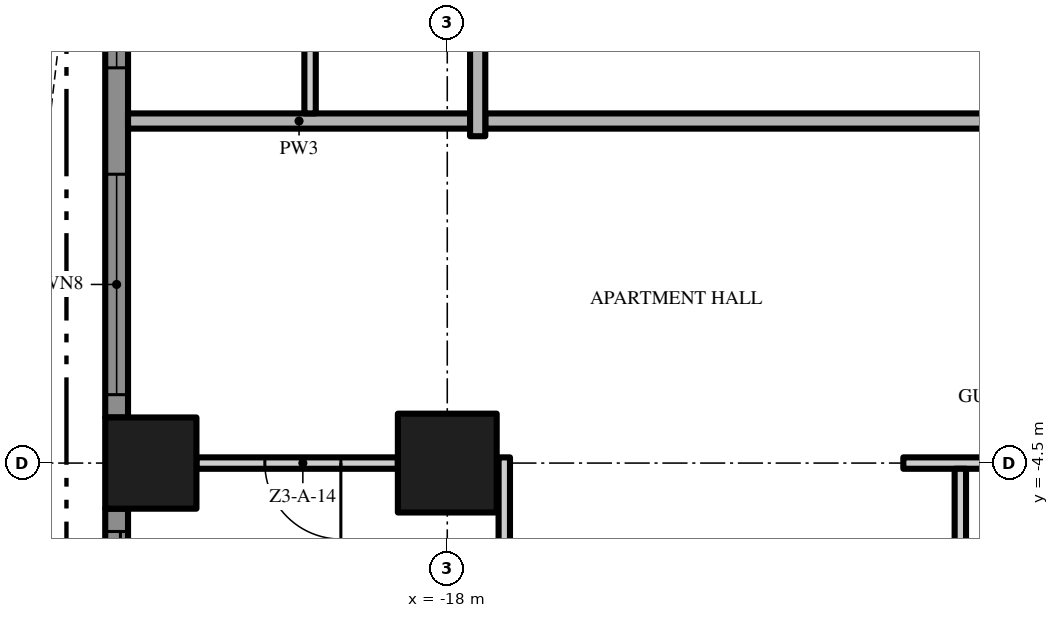
"""IFC4 building model, lengths in metres.
Left out: names, types, materials, properties, quantities, classifications, styles, units other than length and angle.
Written with IfcOpenShell. Run it as: python <this file> out.ifc"""

import sys

from ifc_helpers import new_model, si_unit, direction, frame, frame_2d, origin, origin_2d, place, context, subcontext, project, spatial, polyline, rectangle, outline, extrude, element, fill, save


model = new_model("IFC4")
c1 = context("Model", 3, precision=1e-05, world=origin(), true_north=direction((0.0, 1.0)))
c2 = subcontext(c1, "Body", "Model", "MODEL_VIEW")
j1 = project(units=[si_unit("LENGTHUNIT", "METRE"), si_unit("PLANEANGLEUNIT", "RADIAN")], contexts=[c1])
p1 = place(None, origin())
s1 = spatial("IfcSite", under=j1, at=p1, CompositionType="ELEMENT")
p2 = place(p1, origin())
s2 = spatial("IfcBuilding", under=s1, at=p2, CompositionType="ELEMENT")
p3 = place(p2, frame((0.0, 0.0, 132.6)))
s3 = spatial("IfcBuildingStorey", under=s2, at=p3, CompositionType="ELEMENT", Elevation=132.6)
p4 = place(p3, frame((-18.0, -4.5, 0.0), z_axis=(0.0, 0.0, 1.0), x_axis=(1.0, 0.0, 0.0)))
e1 = element("IfcColumn", 1, at=p4, inside=s3, PredefinedType="COLUMN", context=c2, shape_type="SweptSolid", body=[
    extrude(rectangle(XDim=1.3, YDim=1.3, at=origin_2d()), origin(), (0.0, 0.0, 1.0), 3.5),
])
p5 = place(p3, frame((-21.9, -4.5, 0.0), z_axis=(0.0, 0.0, 1.0), x_axis=(1.0, 0.0, 0.0)))
e2 = element("IfcColumn", 2, at=p5, inside=s3, PredefinedType="COLUMN", context=c2, shape_type="SweptSolid", body=[
    extrude(rectangle(XDim=1.2, YDim=1.2, at=origin_2d()), origin(), (0.0, 0.0, 1.0), 3.5),
])
p6 = place(p3, frame((-22.35, -3.9, 0.0), z_axis=(0.0, 0.0, 1.0), x_axis=(0.0, 1.0, 0.0)))
e3 = element("IfcWall", 3, at=p6, inside=s3, PredefinedType="SOLIDWALL", context=c2, shape_type="SweptSolid", body=[
    extrude(rectangle(XDim=7.8, YDim=0.3, at=frame_2d((3.9, 0.0))), origin(), (0.0, 0.0, 1.0), 3.5),
])
p7 = place(p6, frame((4.6, 0.0, 0.45)))
e4 = element("IfcOpeningElement", 4, at=p7, cuts=e3, PredefinedType="OPENING", context=c2, shape_type="SweptSolid", body=[
    extrude(rectangle(XDim=2.9, YDim=2.65, at=frame_2d((1.45, 1.325))), frame((0.0, 0.16, 0.0), z_axis=(0.0, -1.0, 0.0), x_axis=(1.0, 0.0, 0.0)), (0.0, 0.0, 1.0), 0.32),
])
p8 = place(p6, frame((0.3, 0.0, 0.45)))
e5 = element("IfcOpeningElement", 5, at=p8, cuts=e3, PredefinedType="OPENING", context=c2, shape_type="SweptSolid", body=[
    extrude(rectangle(XDim=2.9, YDim=2.65, at=frame_2d((1.45, 1.325))), frame((0.0, 0.16, 0.0), z_axis=(0.0, -1.0, 0.0), x_axis=(1.0, 0.0, 0.0)), (0.0, 0.0, 1.0), 0.32),
])
p9 = place(p3, frame((-22.35, -12.3, 0.0), z_axis=(0.0, 0.0, 1.0), x_axis=(0.0, 1.0, 0.0)))
e6 = element("IfcWall", 6, at=p9, inside=s3, PredefinedType="SOLIDWALL", context=c2, shape_type="SweptSolid", body=[
    extrude(rectangle(XDim=7.2, YDim=0.3, at=frame_2d((3.6, 0.0))), origin(), (0.0, 0.0, 1.0), 3.5),
])
p10 = place(p9, frame((4.0, 0.0, 0.0)))
e7 = element("IfcOpeningElement", 7, at=p10, cuts=e6, PredefinedType="OPENING", context=c2, shape_type="SweptSolid", body=[
    extrude(rectangle(XDim=2.9, YDim=2.4, at=frame_2d((1.45, 1.2))), frame((0.0, 0.16, 0.0), z_axis=(0.0, -1.0, 0.0), x_axis=(1.0, 0.0, 0.0)), (0.0, 0.0, 1.0), 0.32),
])
p11 = place(p9, frame((0.3, 0.0, 0.45)))
e8 = element("IfcOpeningElement", 8, at=p11, cuts=e6, PredefinedType="OPENING", context=c2, shape_type="SweptSolid", body=[
    extrude(rectangle(XDim=2.3, YDim=2.65, at=frame_2d((1.15, 1.325))), frame((0.0, 0.16, 0.0), z_axis=(0.0, -1.0, 0.0), x_axis=(1.0, 0.0, 0.0)), (0.0, 0.0, 1.0), 0.32),
])
p12 = place(p3, origin())
e9 = element("IfcWall", 9, at=p12, inside=s3, PredefinedType="USERDEFINED", context=c2, shape_type="SweptSolid", body=[
    extrude(outline(polyline([(-23.451, 18.0), (-23.115, 16.5), (-23.1, 16.125), (-23.231, 15.0), (-23.755, 13.5), (-24.488, 12.0), (-25.149, 10.5), (-25.485, 9.0), (-25.5, 8.625), (-25.369, 7.5), (-24.845, 6.0), (-24.112, 4.5), (-23.451, 3.0), (-23.115, 1.5), (-23.1, 1.125), (-23.231, 0.0), (-23.755, -1.5), (-24.488, -3.0), (-25.149, -4.5), (-25.485, -6.0), (-25.5, -6.375), (-25.369, -7.5), (-24.845, -9.0), (-24.112, -10.5), (-23.451, -12.0), (-23.115, -13.5), (-22.871, -13.445), (-23.213, -11.921), (-23.885, -10.395), (-24.614, -8.904), (-25.124, -7.444), (-25.249, -6.365), (-25.236, -6.033), (-24.91, -4.579), (-24.261, -3.105), (-23.524, -1.596), (-22.986, -0.056), (-22.849, 1.115), (-22.866, 1.533), (-23.213, 3.079), (-23.885, 4.605), (-24.614, 6.096), (-25.124, 7.556), (-25.249, 8.635), (-25.236, 8.967), (-24.91, 10.421), (-24.261, 11.895), (-23.524, 13.404), (-22.986, 14.944), (-22.849, 16.115), (-22.866, 16.533), (-23.208, 18.055), (-23.451, 18.0)])), origin(), (0.0, 0.0, 1.0), 0.9),
])
p13 = place(p3, frame((-18.65, -4.5, 0.0), z_axis=(0.0, 0.0, 1.0), x_axis=(-1.0, 0.0, 0.0)))
e10 = element("IfcWall", 10, at=p13, inside=s3, PredefinedType="PARTITIONING", context=c2, shape_type="SweptSolid", body=[
    extrude(rectangle(XDim=2.65, YDim=0.15, at=frame_2d((1.325, 0.0))), origin(), (0.0, 0.0, 1.0), 3.5),
])
p14 = place(p13, frame((0.75, 0.0, 0.0)))
e11 = element("IfcOpeningElement", 11, at=p14, cuts=e10, PredefinedType="OPENING", context=c2, shape_type="SweptSolid", body=[
    extrude(rectangle(XDim=1.0, YDim=2.4, at=frame_2d((0.5, 1.2))), frame((0.0, 0.085, 0.0), z_axis=(0.0, -1.0, 0.0), x_axis=(1.0, 0.0, 0.0)), (0.0, 0.0, 1.0), 0.17),
])
p15 = place(p3, frame((-12.0, -4.5, 0.0), z_axis=(0.0, 0.0, 1.0), x_axis=(1.0, 0.0, 0.0)))
e12 = element("IfcWall", 12, at=p15, inside=s3, PredefinedType="PARTITIONING", context=c2, shape_type="SweptSolid", body=[
    extrude(rectangle(XDim=2.35, YDim=0.15, at=frame_2d((1.175, 0.0))), origin(), (0.0, 0.0, 1.0), 3.5),
])
p16 = place(p3, frame((17.5, 0.0, 0.0), z_axis=(0.0, 0.0, 1.0), x_axis=(-1.0, 0.0, 0.0)))
e13 = element("IfcWall", 13, at=p16, inside=s3, PredefinedType="PARTITIONING", context=c2, shape_type="SweptSolid", body=[
    extrude(rectangle(XDim=35.0, YDim=0.2, at=frame_2d((17.5, 0.0))), origin(), (0.0, 0.0, 1.0), 3.5),
])
p17 = place(p16, frame((16.75, 0.0, 0.0)))
e14 = element("IfcOpeningElement", 14, at=p17, cuts=e13, PredefinedType="OPENING", context=c2, shape_type="SweptSolid", body=[
    extrude(rectangle(XDim=1.5, YDim=2.4, at=frame_2d((0.75, 1.2))), frame((0.0, 0.11, 0.0), z_axis=(0.0, -1.0, 0.0), x_axis=(1.0, 0.0, 0.0)), (0.0, 0.0, 1.0), 0.22),
])
p18 = place(p3, frame((-22.2, 0.0, 0.0), z_axis=(0.0, 0.0, 1.0), x_axis=(1.0, 0.0, 0.0)))
e15 = element("IfcWall", 15, at=p18, inside=s3, PredefinedType="PARTITIONING", context=c2, shape_type="SweptSolid", body=[
    extrude(rectangle(XDim=4.5, YDim=0.2, at=frame_2d((2.25, 0.0))), origin(), (0.0, 0.0, 1.0), 3.5),
])
p19 = place(p3, frame((-19.805, 0.1, 0.0), z_axis=(0.0, 0.0, 1.0), x_axis=(0.0, 1.0, 0.0)))
e16 = element("IfcWall", 16, at=p19, inside=s3, PredefinedType="PARTITIONING", context=c2, shape_type="SweptSolid", body=[
    extrude(rectangle(XDim=2.225, YDim=0.15, at=frame_2d((1.113, 0.0))), origin(), (0.0, 0.0, 1.0), 3.5),
])
p20 = place(p3, frame((-17.6, -0.2, 0.0), z_axis=(0.0, 0.0, 1.0), x_axis=(0.0, 1.0, 0.0)))
e17 = element("IfcWall", 17, at=p20, inside=s3, PredefinedType="PARTITIONING", context=c2, shape_type="SweptSolid", body=[
    extrude(rectangle(XDim=4.05, YDim=0.2, at=frame_2d((2.025, 0.0))), origin(), (0.0, 0.0, 1.0), 3.5),
])
p21 = place(p3, frame((-17.25, -8.925, 0.0), z_axis=(0.0, 0.0, 1.0), x_axis=(0.0, 1.0, 0.0)))
e18 = element("IfcWall", 18, at=p21, inside=s3, PredefinedType="PARTITIONING", context=c2, shape_type="SweptSolid", body=[
    extrude(rectangle(XDim=4.5, YDim=0.15, at=frame_2d((2.25, 0.0))), origin(), (0.0, 0.0, 1.0), 3.5),
])
p22 = place(p3, frame((-11.25, -4.575, 0.0), z_axis=(0.0, 0.0, 1.0), x_axis=(0.0, -1.0, 0.0)))
e19 = element("IfcWall", 19, at=p22, inside=s3, PredefinedType="PARTITIONING", context=c2, shape_type="SweptSolid", body=[
    extrude(rectangle(XDim=7.5, YDim=0.15, at=frame_2d((3.75, 0.0))), origin(), (0.0, 0.0, 1.0), 3.5),
])
p23 = place(p22, frame((1.725, 0.0, 0.0)))
e20 = element("IfcOpeningElement", 20, at=p23, cuts=e19, PredefinedType="OPENING", context=c2, shape_type="SweptSolid", body=[
    extrude(rectangle(XDim=0.9, YDim=2.1, at=frame_2d((0.45, 1.05))), frame((0.0, 0.085, 0.0), z_axis=(0.0, -1.0, 0.0), x_axis=(1.0, 0.0, 0.0)), (0.0, 0.0, 1.0), 0.17),
])
p24 = place(p7, origin())
e21 = element("IfcWindow", 21, at=p24, inside=s3, PartitioningType="SINGLE_PANEL", PredefinedType="WINDOW", context=c2, shape_type="SweptSolid", body=[
    extrude(rectangle(XDim=2.9, YDim=2.65, at=frame_2d((1.45, 1.325))), frame((0.0, 0.03, 0.0), z_axis=(0.0, -1.0, 0.0), x_axis=(1.0, 0.0, 0.0)), (0.0, 0.0, 1.0), 0.06),
])
fill(e4, e21)
p25 = place(p8, origin())
e22 = element("IfcWindow", 22, at=p25, inside=s3, PartitioningType="SINGLE_PANEL", PredefinedType="WINDOW", context=c2, shape_type="SweptSolid", body=[
    extrude(rectangle(XDim=2.9, YDim=2.65, at=frame_2d((1.45, 1.325))), frame((0.0, 0.03, 0.0), z_axis=(0.0, -1.0, 0.0), x_axis=(1.0, 0.0, 0.0)), (0.0, 0.0, 1.0), 0.06),
])
fill(e5, e22)
p26 = place(p10, origin())
e23 = element("IfcDoor", 23, at=p26, inside=s3, OperationType="SINGLE_SWING_LEFT", PredefinedType="DOOR", context=c2, shape_type="SweptSolid", body=[
    extrude(rectangle(XDim=2.9, YDim=2.4, at=frame_2d((1.45, 1.2))), frame((0.0, 0.025, 0.0), z_axis=(0.0, -1.0, 0.0), x_axis=(1.0, 0.0, 0.0)), (0.0, 0.0, 1.0), 0.05),
])
fill(e7, e23)
p27 = place(p14, origin())
e24 = element("IfcDoor", 24, at=p27, inside=s3, OperationType="SINGLE_SWING_LEFT", PredefinedType="DOOR", context=c2, shape_type="SweptSolid", body=[
    extrude(rectangle(XDim=1.0, YDim=2.4, at=frame_2d((0.5, 1.2))), frame((0.0, 0.025, 0.0), z_axis=(0.0, -1.0, 0.0), x_axis=(1.0, 0.0, 0.0)), (0.0, 0.0, 1.0), 0.05),
])
fill(e11, e24)
save(model, sys.argv[1])
